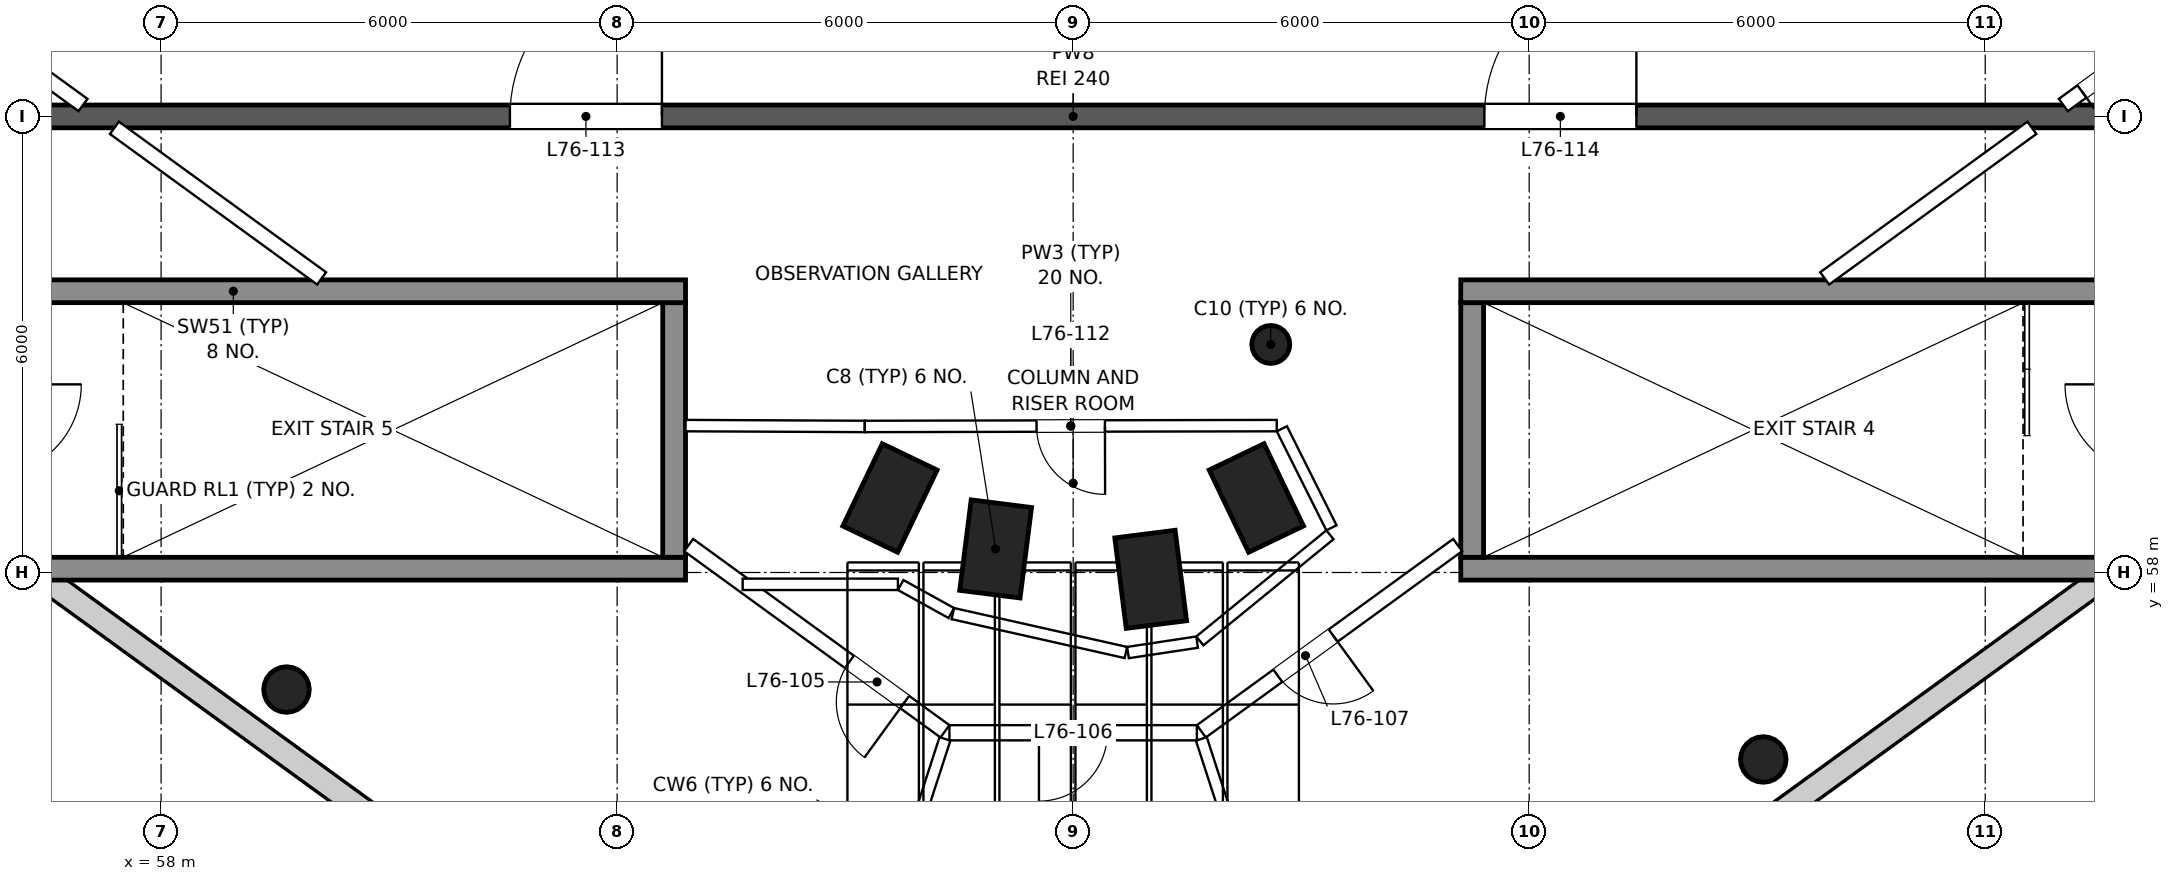
"""IFC4 building model, lengths in metres.
Left out: names, types, materials, properties, quantities, classifications, styles, units other than length and angle.
Written with IfcOpenShell. Run it as: python <this file> out.ifc"""

import sys

from ifc_helpers import new_model, si_unit, direction, frame, frame_2d, origin, origin_2d, place, context, subcontext, project, spatial, polyline, rectangle, circle, outline, extrude, element, fill, save


model = new_model("IFC4")
c1 = context("Model", 3, precision=1e-05, world=origin(), true_north=direction((0.0, 1.0)))
c2 = subcontext(c1, "Body", "Model", "MODEL_VIEW")
j1 = project(units=[si_unit("LENGTHUNIT", "METRE"), si_unit("PLANEANGLEUNIT", "RADIAN")], contexts=[c1])
p1 = place(None, origin())
s1 = spatial("IfcSite", under=j1, at=p1, CompositionType="ELEMENT")
p2 = place(p1, origin())
s2 = spatial("IfcBuilding", under=s1, at=p2, CompositionType="ELEMENT")
p3 = place(p2, frame((0.0, 0.0, 321.7)))
s3 = spatial("IfcBuildingStorey", under=s2, at=p3, CompositionType="ELEMENT", Elevation=321.7)
for number, where, z_axis, x_axis in (
    (1, (67.59, 58.98, 0.0), (0.0, 0.0, 1.0), (-0.902, 0.432, 0.0)),
    (2, (68.98, 58.31, 0.0), (0.0, 0.0, 1.0), (-0.992, 0.126, 0.0)),
    (3, (71.02, 57.91, 0.0), (0.0, 0.0, 1.0), (-0.992, -0.126, 0.0)),
    (4, (72.41, 58.98, 0.0), (0.0, 0.0, 1.0), (-0.902, -0.432, 0.0)),
):
    element("IfcColumn", number, at=place(p3, frame(where, z_axis=z_axis, x_axis=x_axis)), inside=s3, PredefinedType="COLUMN", context=c2, shape_type="SweptSolid", body=[
        extrude(rectangle(XDim=0.8, YDim=1.2, at=origin_2d()), origin(), (0.0, 0.0, 1.0), 7.0),
    ])
p4 = place(p3, frame((72.6, 61.0, 0.0), z_axis=(0.0, 0.0, 1.0), x_axis=(1.0, 0.0, 0.0)))
e5 = element("IfcColumn", 5, at=p4, inside=s3, PredefinedType="COLUMN", context=c2, shape_type="SweptSolid", body=[
    extrude(circle(Radius=0.25, at=origin_2d()), origin(), (0.0, 0.0, 1.0), 7.0),
])
for number, where, z_axis, x_axis in (
    (6, (59.65, 56.46, 0.0), (0.0, 0.0, 1.0), (1.0, 0.0, 0.0)),
    (7, (79.08, 55.54, 0.0), (0.0, 0.0, 1.0), (1.0, 0.0, 0.0)),
):
    element("IfcColumn", number, at=place(p3, frame(where, z_axis=z_axis, x_axis=x_axis)), inside=s3, PredefinedType="COLUMN", context=c2, shape_type="SweptSolid", body=[
        extrude(circle(Radius=0.3, at=origin_2d()), origin(), (0.0, 0.0, 1.0), 7.0),
    ])
p5 = place(p3, frame((49.636, 62.88, 0.0), z_axis=(0.0, 0.0, 1.0), x_axis=(0.809009420969, -0.587795676051, 0.0)))
e8 = element("IfcWall", 8, at=p5, inside=s3, PredefinedType="SOLIDWALL", context=c2, shape_type="SweptSolid", body=[
    extrude(outline(polyline([(0.0, 0.0), (16.487, 0.0), (16.487, 9.427), (15.364, 10.012), (15.362, 6.7), (0.0, 6.7), (0.0, 0.0)])), frame((0.0, 0.16, 0.0), z_axis=(0.0, -1.0, 0.0), x_axis=(1.0, 0.0, 0.0)), (0.0, 0.0, 1.0), 0.32),
])
p6 = place(p3, frame((77.026, 53.189, 0.0), z_axis=(0.0, 0.0, 1.0), x_axis=(0.809009420969, 0.587795676051, 0.0)))
e9 = element("IfcWall", 9, at=p6, inside=s3, PredefinedType="SOLIDWALL", context=c2, shape_type="SweptSolid", body=[
    extrude(outline(polyline([(0.0, 0.0), (16.487, 0.0), (16.485, 6.7), (1.126, 6.7), (1.124, 10.012), (0.0, 9.427), (0.0, 0.0)])), frame((0.0, 0.16, 0.0), z_axis=(0.0, -1.0, 0.0), x_axis=(1.0, 0.0, 0.0)), (0.0, 0.0, 1.0), 0.32),
])
for number, where, z_axis, x_axis in (
    (10, (55.9, 58.05, 0.0), (0.0, 0.0, 1.0), (1.0, 0.0, 0.0)),
    (11, (75.1, 58.05, 0.0), (0.0, 0.0, 1.0), (1.0, 0.0, 0.0)),
):
    element("IfcWall", number, at=place(p3, frame(where, z_axis=z_axis, x_axis=x_axis)), inside=s3, PredefinedType="SHEAR", context=c2, shape_type="SweptSolid", body=[
        extrude(rectangle(XDim=9.0, YDim=0.3, at=frame_2d((4.5, 0.0))), origin(), (0.0, 0.0, 1.0), 7.0),
    ])
for number, where, z_axis, x_axis in (
    (12, (64.75, 58.2, 0.0), (0.0, 0.0, 1.0), (0.0, 1.0, 0.0)),
    (13, (75.25, 58.2, 0.0), (0.0, 0.0, 1.0), (0.0, 1.0, 0.0)),
):
    element("IfcWall", number, at=place(p3, frame(where, z_axis=z_axis, x_axis=x_axis)), inside=s3, PredefinedType="SHEAR", context=c2, shape_type="SweptSolid", body=[
        extrude(rectangle(XDim=3.35, YDim=0.3, at=frame_2d((1.675, 0.0))), origin(), (0.0, 0.0, 1.0), 7.0),
    ])
p7 = place(p3, frame((53.0, 61.7, 0.0), z_axis=(0.0, 0.0, 1.0), x_axis=(1.0, 0.0, 0.0)))
e14 = element("IfcWall", 14, at=p7, inside=s3, PredefinedType="SHEAR", context=c2, shape_type="SweptSolid", body=[
    extrude(rectangle(XDim=11.9, YDim=0.3, at=frame_2d((5.95, 0.0))), origin(), (0.0, 0.0, 1.0), 7.0),
])
p8 = place(p7, frame((0.85, 0.0, 0.0)))
e15 = element("IfcOpeningElement", 15, at=p8, cuts=e14, PredefinedType="OPENING", context=c2, shape_type="SweptSolid", body=[
    extrude(rectangle(XDim=1.1, YDim=2.1, at=frame_2d((0.55, 1.05))), frame((0.0, 0.16, 0.0), z_axis=(0.0, -1.0, 0.0), x_axis=(1.0, 0.0, 0.0)), (0.0, 0.0, 1.0), 0.32),
])
p9 = place(p3, frame((75.1, 61.7, 0.0), z_axis=(0.0, 0.0, 1.0), x_axis=(1.0, 0.0, 0.0)))
e16 = element("IfcWall", 16, at=p9, inside=s3, PredefinedType="SHEAR", context=c2, shape_type="SweptSolid", body=[
    extrude(rectangle(XDim=11.9, YDim=0.3, at=frame_2d((5.95, 0.0))), origin(), (0.0, 0.0, 1.0), 7.0),
])
p10 = place(p9, frame((9.95, 0.0, 0.0)))
e17 = element("IfcOpeningElement", 17, at=p10, cuts=e16, PredefinedType="OPENING", context=c2, shape_type="SweptSolid", body=[
    extrude(rectangle(XDim=1.1, YDim=2.1, at=frame_2d((0.55, 1.05))), frame((0.0, 0.16, 0.0), z_axis=(0.0, -1.0, 0.0), x_axis=(1.0, 0.0, 0.0)), (0.0, 0.0, 1.0), 0.32),
])
p11 = place(p3, frame((49.44, 64.0, 0.0), z_axis=(0.0, 0.0, 1.0), x_axis=(1.0, 0.0, 0.0)))
e18 = element("IfcWall", 18, at=p11, inside=s3, PredefinedType="PARTITIONING", context=c2, shape_type="SweptSolid", body=[
    extrude(rectangle(XDim=41.12, YDim=0.3, at=frame_2d((20.56, 0.0))), origin(), (0.0, 0.0, 1.0), 6.7),
])
p12 = place(p11, frame((13.15, 0.0, 0.0)))
e19 = element("IfcOpeningElement", 19, at=p12, cuts=e18, PredefinedType="OPENING", context=c2, shape_type="SweptSolid", body=[
    extrude(rectangle(XDim=2.0, YDim=2.1, at=frame_2d((1.0, 1.05))), frame((0.0, 0.16, 0.0), z_axis=(0.0, -1.0, 0.0), x_axis=(1.0, 0.0, 0.0)), (0.0, 0.0, 1.0), 0.32),
])
p13 = place(p11, frame((25.97, 0.0, 0.0)))
e20 = element("IfcOpeningElement", 20, at=p13, cuts=e18, PredefinedType="OPENING", context=c2, shape_type="SweptSolid", body=[
    extrude(rectangle(XDim=2.0, YDim=2.1, at=frame_2d((1.0, 1.05))), frame((0.0, 0.16, 0.0), z_axis=(0.0, -1.0, 0.0), x_axis=(1.0, 0.0, 0.0)), (0.0, 0.0, 1.0), 0.32),
])
p14 = place(p3, frame((85.796, 66.161, 0.0), z_axis=(0.0, 0.0, 1.0), x_axis=(-0.80899208188, -0.587819539872, 0.0)))
e21 = element("IfcWall", 21, at=p14, inside=s3, PredefinedType="PARTITIONING", context=c2, shape_type="SweptSolid", body=[
    extrude(rectangle(XDim=3.422, YDim=0.2, at=frame_2d((1.711, 0.0))), origin(), (0.0, 0.0, 1.0), 6.7),
])
p15 = place(p14, frame((2.219, 0.0, 0.0)))
e22 = element("IfcOpeningElement", 22, at=p15, cuts=e21, PredefinedType="OPENING", context=c2, shape_type="SweptSolid", body=[
    extrude(rectangle(XDim=0.9, YDim=2.1, at=frame_2d((0.45, 1.05))), frame((0.0, 0.11, 0.0), z_axis=(0.0, -1.0, 0.0), x_axis=(1.0, 0.0, 0.0)), (0.0, 0.0, 1.0), 0.22),
])
p16 = place(p3, frame((82.615, 63.85, 0.0), z_axis=(0.0, 0.0, 1.0), x_axis=(-0.809017922832, -0.587783974379, 0.0)))
e23 = element("IfcWall", 23, at=p16, inside=s3, PredefinedType="PARTITIONING", context=c2, shape_type="SweptSolid", body=[
    extrude(rectangle(XDim=3.37, YDim=0.2, at=frame_2d((1.685, 0.0))), origin(), (0.0, 0.0, 1.0), 6.7),
])
p17 = place(p3, frame((75.059, 58.361, 0.0), z_axis=(0.0, 0.0, 1.0), x_axis=(-0.809017144694, -0.587785045396, 0.0)))
e24 = element("IfcWall", 24, at=p17, inside=s3, PredefinedType="PARTITIONING", context=c2, shape_type="SweptSolid", body=[
    extrude(rectangle(XDim=4.168, YDim=0.2, at=frame_2d((2.084, 0.0))), origin(), (0.0, 0.0, 1.0), 6.7),
])
p18 = place(p17, frame((2.025, 0.0, 0.0)))
e25 = element("IfcOpeningElement", 25, at=p18, cuts=e24, PredefinedType="OPENING", context=c2, shape_type="SweptSolid", body=[
    extrude(rectangle(XDim=0.9, YDim=2.1, at=frame_2d((0.45, 1.05))), frame((0.0, 0.11, 0.0), z_axis=(0.0, -1.0, 0.0), x_axis=(1.0, 0.0, 0.0)), (0.0, 0.0, 1.0), 0.22),
])
p19 = place(p3, frame((71.628, 55.892, 0.0), z_axis=(0.0, 0.0, 1.0), x_axis=(-1.0, 0.0, 0.0)))
e26 = element("IfcWall", 26, at=p19, inside=s3, PredefinedType="PARTITIONING", context=c2, shape_type="SweptSolid", body=[
    extrude(rectangle(XDim=3.256, YDim=0.2, at=frame_2d((1.628, 0.0))), origin(), (0.0, 0.0, 1.0), 6.7),
])
p20 = place(p19, frame((1.178, 0.0, 0.0)))
e27 = element("IfcOpeningElement", 27, at=p20, cuts=e26, PredefinedType="OPENING", context=c2, shape_type="SweptSolid", body=[
    extrude(rectangle(XDim=0.9, YDim=2.1, at=frame_2d((0.45, 1.05))), frame((0.0, 0.11, 0.0), z_axis=(0.0, -1.0, 0.0), x_axis=(1.0, 0.0, 0.0)), (0.0, 0.0, 1.0), 0.22),
])
p21 = place(p3, frame((68.313, 55.911, 0.0), z_axis=(0.0, 0.0, 1.0), x_axis=(-0.809017144694, 0.587785045396, 0.0)))
e28 = element("IfcWall", 28, at=p21, inside=s3, PredefinedType="PARTITIONING", context=c2, shape_type="SweptSolid", body=[
    extrude(rectangle(XDim=4.168, YDim=0.2, at=frame_2d((2.084, 0.0))), origin(), (0.0, 0.0, 1.0), 6.7),
])
p22 = place(p21, frame((0.654, 0.0, 0.0)))
e29 = element("IfcOpeningElement", 29, at=p22, cuts=e28, PredefinedType="OPENING", context=c2, shape_type="SweptSolid", body=[
    extrude(rectangle(XDim=0.9, YDim=2.1, at=frame_2d((0.45, 1.05))), frame((0.0, 0.11, 0.0), z_axis=(0.0, -1.0, 0.0), x_axis=(1.0, 0.0, 0.0)), (0.0, 0.0, 1.0), 0.22),
])
p23 = place(p3, frame((60.112, 61.869, 0.0), z_axis=(0.0, 0.0, 1.0), x_axis=(-0.809017922832, 0.587783974379, 0.0)))
e30 = element("IfcWall", 30, at=p23, inside=s3, PredefinedType="PARTITIONING", context=c2, shape_type="SweptSolid", body=[
    extrude(rectangle(XDim=3.37, YDim=0.2, at=frame_2d((1.685, 0.0))), origin(), (0.0, 0.0, 1.0), 6.7),
])
p24 = place(p3, frame((56.973, 64.15, 0.0), z_axis=(0.0, 0.0, 1.0), x_axis=(-0.80899208188, 0.587819539872, 0.0)))
e31 = element("IfcWall", 31, at=p24, inside=s3, PredefinedType="PARTITIONING", context=c2, shape_type="SweptSolid", body=[
    extrude(rectangle(XDim=3.422, YDim=0.2, at=frame_2d((1.711, 0.0))), origin(), (0.0, 0.0, 1.0), 6.7),
])
p25 = place(p24, frame((0.682, 0.0, 0.0)))
e32 = element("IfcOpeningElement", 32, at=p25, cuts=e31, PredefinedType="OPENING", context=c2, shape_type="SweptSolid", body=[
    extrude(rectangle(XDim=0.9, YDim=2.1, at=frame_2d((0.45, 1.05))), frame((0.0, 0.11, 0.0), z_axis=(0.0, -1.0, 0.0), x_axis=(1.0, 0.0, 0.0)), (0.0, 0.0, 1.0), 0.22),
])
for number, where, z_axis, x_axis in (
    (33, (66.656, 50.711, 0.0), (0.0, 0.0, 1.0), (0.309, 0.951, 0.0)),
    (34, (73.344, 50.711, 0.0), (0.0, 0.0, 1.0), (-0.309, 0.951, 0.0)),
):
    element("IfcWall", number, at=place(p3, frame(where, z_axis=z_axis, x_axis=x_axis)), inside=s3, PredefinedType="PARTITIONING", context=c2, shape_type="SweptSolid", body=[
        extrude(rectangle(XDim=5.362, YDim=0.15, at=frame_2d((2.681, 0.0))), origin(), (0.0, 0.0, 1.0), 6.7),
    ])
p26 = place(p3, frame((68.397, 57.466, 0.0), z_axis=(0.0, 0.0, 1.0), x_axis=(-0.874987806076, 0.484144956825, 0.0)))
e35 = element("IfcWall", 35, at=p26, inside=s3, PredefinedType="PARTITIONING", context=c2, shape_type="SweptSolid", body=[
    extrude(rectangle(XDim=0.761, YDim=0.15, at=frame_2d((0.381, 0.0))), origin(), (0.0, 0.0, 1.0), 6.7),
])
p27 = place(p3, frame((67.695, 57.844, 0.0), z_axis=(0.0, 0.0, 1.0), x_axis=(-1.0, 0.0, 0.0)))
e36 = element("IfcWall", 36, at=p27, inside=s3, PredefinedType="PARTITIONING", context=c2, shape_type="SweptSolid", body=[
    extrude(rectangle(XDim=2.043, YDim=0.15, at=frame_2d((1.021, 0.0))), origin(), (0.0, 0.0, 1.0), 6.7),
])
p28 = place(p3, frame((64.9, 59.932, 0.0), z_axis=(0.0, 0.0, 1.0), x_axis=(0.999989145407, -0.004659299187, 0.0)))
e37 = element("IfcWall", 37, at=p28, inside=s3, PredefinedType="PARTITIONING", context=c2, shape_type="SweptSolid", body=[
    extrude(rectangle(XDim=2.358, YDim=0.15, at=frame_2d((1.179, 0.0))), origin(), (0.0, 0.0, 1.0), 6.7),
])
p29 = place(p3, frame((67.258, 59.921, 0.0), z_axis=(0.0, 0.0, 1.0), x_axis=(0.999997945957, 0.002026840265, 0.0)))
e38 = element("IfcWall", 38, at=p29, inside=s3, PredefinedType="PARTITIONING", context=c2, shape_type="SweptSolid", body=[
    extrude(rectangle(XDim=5.42, YDim=0.15, at=frame_2d((2.71, 0.0))), origin(), (0.0, 0.0, 1.0), 6.7),
])
p30 = place(p29, frame((2.26, 0.0, 0.0)))
e39 = element("IfcOpeningElement", 39, at=p30, cuts=e38, PredefinedType="OPENING", context=c2, shape_type="SweptSolid", body=[
    extrude(rectangle(XDim=0.9, YDim=2.1, at=frame_2d((0.45, 1.05))), frame((0.0, 0.085, 0.0), z_axis=(0.0, -1.0, 0.0), x_axis=(1.0, 0.0, 0.0)), (0.0, 0.0, 1.0), 0.17),
])
p31 = place(p3, frame((72.746, 59.891, 0.0), z_axis=(0.0, 0.0, 1.0), x_axis=(0.447615600259, -0.894226075668, 0.0)))
e40 = element("IfcWall", 40, at=p31, inside=s3, PredefinedType="PARTITIONING", context=c2, shape_type="SweptSolid", body=[
    extrude(rectangle(XDim=1.457, YDim=0.15, at=frame_2d((0.729, 0.0))), origin(), (0.0, 0.0, 1.0), 6.7),
])
p32 = place(p3, frame((73.378, 58.496, 0.0), z_axis=(0.0, 0.0, 1.0), x_axis=(-0.774892088392, -0.632093546358, 0.0)))
e41 = element("IfcWall", 41, at=p32, inside=s3, PredefinedType="PARTITIONING", context=c2, shape_type="SweptSolid", body=[
    extrude(rectangle(XDim=2.209, YDim=0.15, at=frame_2d((1.104, 0.0))), origin(), (0.0, 0.0, 1.0), 6.7),
])
p33 = place(p3, frame((71.631, 57.084, 0.0), z_axis=(0.0, 0.0, 1.0), x_axis=(-0.988809432603, -0.14918413453, 0.0)))
e42 = element("IfcWall", 42, at=p33, inside=s3, PredefinedType="PARTITIONING", context=c2, shape_type="SweptSolid", body=[
    extrude(rectangle(XDim=0.92, YDim=0.15, at=frame_2d((0.46, 0.0))), origin(), (0.0, 0.0, 1.0), 6.7),
])
p34 = place(p3, frame((70.694, 56.948, 0.0), z_axis=(0.0, 0.0, 1.0), x_axis=(-0.975702102624, 0.219101362241, 0.0)))
e43 = element("IfcWall", 43, at=p34, inside=s3, PredefinedType="PARTITIONING", context=c2, shape_type="SweptSolid", body=[
    extrude(rectangle(XDim=2.333, YDim=0.15, at=frame_2d((1.167, 0.0))), origin(), (0.0, 0.0, 1.0), 6.7),
])
p35 = place(p22, origin())
e44 = element("IfcDoor", 44, at=p35, inside=s3, OperationType="SINGLE_SWING_LEFT", PredefinedType="DOOR", context=c2, shape_type="SweptSolid", body=[
    extrude(rectangle(XDim=0.9, YDim=2.1, at=frame_2d((0.45, 1.05))), frame((0.0, 0.025, 0.0), z_axis=(0.0, -1.0, 0.0), x_axis=(1.0, 0.0, 0.0)), (0.0, 0.0, 1.0), 0.05),
])
fill(e29, e44)
p36 = place(p20, origin())
e45 = element("IfcDoor", 45, at=p36, inside=s3, OperationType="SINGLE_SWING_RIGHT", PredefinedType="DOOR", context=c2, shape_type="SweptSolid", body=[
    extrude(rectangle(XDim=0.9, YDim=2.1, at=frame_2d((0.45, 1.05))), frame((0.0, 0.025, 0.0), z_axis=(0.0, -1.0, 0.0), x_axis=(1.0, 0.0, 0.0)), (0.0, 0.0, 1.0), 0.05),
])
fill(e27, e45)
p37 = place(p18, origin())
e46 = element("IfcDoor", 46, at=p37, inside=s3, OperationType="SINGLE_SWING_LEFT", PredefinedType="DOOR", context=c2, shape_type="SweptSolid", body=[
    extrude(rectangle(XDim=0.9, YDim=2.1, at=frame_2d((0.45, 1.05))), frame((0.0, 0.025, 0.0), z_axis=(0.0, -1.0, 0.0), x_axis=(1.0, 0.0, 0.0)), (0.0, 0.0, 1.0), 0.05),
])
fill(e25, e46)
p38 = place(p15, origin())
e47 = element("IfcDoor", 47, at=p38, inside=s3, OperationType="SINGLE_SWING_RIGHT", PredefinedType="DOOR", context=c2, shape_type="SweptSolid", body=[
    extrude(rectangle(XDim=0.9, YDim=2.1, at=frame_2d((0.45, 1.05))), frame((0.0, 0.025, 0.0), z_axis=(0.0, -1.0, 0.0), x_axis=(1.0, 0.0, 0.0)), (0.0, 0.0, 1.0), 0.05),
])
fill(e22, e47)
p39 = place(p30, frame((0.9, 0.0, 0.0), z_axis=(0.0, 0.0, 1.0), x_axis=(-1.0, 0.0, 0.0)))
e48 = element("IfcDoor", 48, at=p39, inside=s3, OperationType="SINGLE_SWING_LEFT", PredefinedType="DOOR", context=c2, shape_type="SweptSolid", body=[
    extrude(rectangle(XDim=0.9, YDim=2.1, at=frame_2d((0.45, 1.05))), frame((0.0, 0.025, 0.0), z_axis=(0.0, -1.0, 0.0), x_axis=(1.0, 0.0, 0.0)), (0.0, 0.0, 1.0), 0.05),
])
fill(e39, e48)
p40 = place(p12, origin())
e49 = element("IfcDoor", 49, at=p40, inside=s3, OperationType="DOUBLE_DOOR_SINGLE_SWING", PredefinedType="DOOR", context=c2, shape_type="SweptSolid", body=[
    extrude(rectangle(XDim=2.0, YDim=2.1, at=frame_2d((1.0, 1.05))), frame((0.0, 0.025, 0.0), z_axis=(0.0, -1.0, 0.0), x_axis=(1.0, 0.0, 0.0)), (0.0, 0.0, 1.0), 0.05),
])
fill(e19, e49)
p41 = place(p13, origin())
e50 = element("IfcDoor", 50, at=p41, inside=s3, OperationType="DOUBLE_DOOR_SINGLE_SWING", PredefinedType="DOOR", context=c2, shape_type="SweptSolid", body=[
    extrude(rectangle(XDim=2.0, YDim=2.1, at=frame_2d((1.0, 1.05))), frame((0.0, 0.025, 0.0), z_axis=(0.0, -1.0, 0.0), x_axis=(1.0, 0.0, 0.0)), (0.0, 0.0, 1.0), 0.05),
])
fill(e20, e50)
save(model, sys.argv[1])
